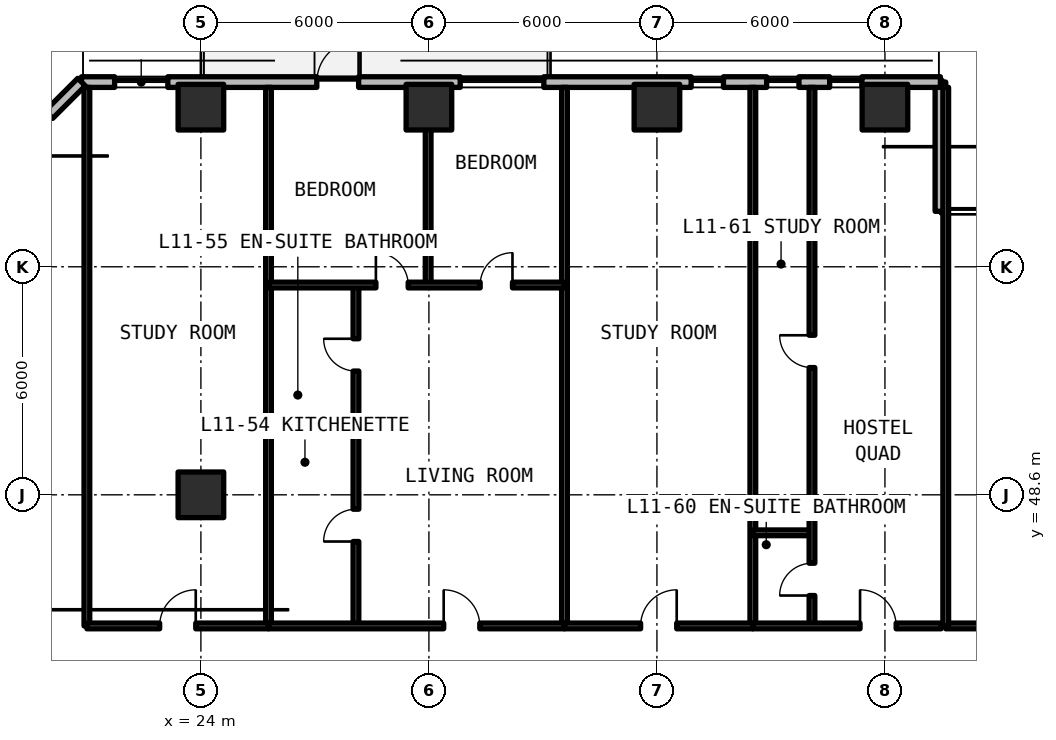
"""IFC4 building model, lengths in metres.
Left out: names, types, materials, properties, quantities, classifications, styles, units other than length and angle.
Written with IfcOpenShell. Run it as: python <this file> out.ifc"""

import sys

from ifc_helpers import new_model, si_unit, direction, frame, frame_2d, origin, origin_2d, place, context, subcontext, project, spatial, rectangle, extrude, element, fill, save


model = new_model("IFC4")
c1 = context("Model", 3, precision=1e-05, world=origin(), true_north=direction((0.0, 1.0)))
c2 = subcontext(c1, "Body", "Model", "MODEL_VIEW")
j1 = project(units=[si_unit("LENGTHUNIT", "METRE"), si_unit("PLANEANGLEUNIT", "RADIAN")], contexts=[c1])
p1 = place(None, origin())
s1 = spatial("IfcSite", under=j1, at=p1, CompositionType="ELEMENT")
p2 = place(p1, origin())
s2 = spatial("IfcBuilding", under=s1, at=p2, CompositionType="ELEMENT")
p3 = place(p2, frame((0.0, 0.0, 42.24)))
s3 = spatial("IfcBuildingStorey", under=s2, at=p3, CompositionType="ELEMENT", Elevation=42.24)
for number, where, z_axis, x_axis in (
    (1, (24.0, 48.6, 0.0), (0.0, 0.0, 1.0), (1.0, 0.0, 0.0)),
    (2, (24.0, 58.8, 0.0), (0.0, 0.0, 1.0), (1.0, 0.0, 0.0)),
    (3, (30.0, 58.8, 0.0), (0.0, 0.0, 1.0), (1.0, 0.0, 0.0)),
    (4, (36.0, 58.8, 0.0), (0.0, 0.0, 1.0), (1.0, 0.0, 0.0)),
    (5, (42.0, 58.8, 0.0), (0.0, 0.0, 1.0), (1.0, 0.0, 0.0)),
):
    element("IfcColumn", number, at=place(p3, frame(where, z_axis=z_axis, x_axis=x_axis)), inside=s3, PredefinedType="COLUMN", context=c2, shape_type="SweptSolid", body=[
        extrude(rectangle(XDim=1.2, YDim=1.2, at=origin_2d()), origin(), (0.0, 0.0, 1.0), 3.3),
    ])
p4 = place(p3, frame((43.46, 56.06, 0.0), z_axis=(0.0, 0.0, 1.0), x_axis=(0.0, 1.0, 0.0)))
e6 = element("IfcWall", 6, at=p4, inside=s3, PredefinedType="SOLIDWALL", context=c2, shape_type="SweptSolid", body=[
    extrude(rectangle(XDim=3.4, YDim=0.28, at=frame_2d((1.7, 0.0))), origin(), (0.0, 0.0, 1.0), 3.08),
])
p5 = place(p3, frame((43.46, 59.46, 0.0), z_axis=(0.0, 0.0, 1.0), x_axis=(-1.0, 0.0, 0.0)))
e7 = element("IfcWall", 7, at=p5, inside=s3, PredefinedType="SOLIDWALL", context=c2, shape_type="SweptSolid", body=[
    extrude(rectangle(XDim=22.602, YDim=0.28, at=frame_2d((11.301, 0.0))), origin(), (0.0, 0.0, 1.0), 3.08),
])
p6 = place(p5, frame((15.31, 0.0, 0.0)))
e8 = element("IfcOpeningElement", 8, at=p6, cuts=e7, PredefinedType="OPENING", context=c2, shape_type="SweptSolid", body=[
    extrude(rectangle(XDim=1.1, YDim=2.15, at=frame_2d((0.55, 1.075))), frame((0.0, 0.15, 0.0), z_axis=(0.0, -1.0, 0.0), x_axis=(1.0, 0.0, 0.0)), (0.0, 0.0, 1.0), 0.3),
])
p7 = place(p5, frame((20.33, 0.0, 0.78)))
e9 = element("IfcOpeningElement", 9, at=p7, cuts=e7, PredefinedType="OPENING", context=c2, shape_type="SweptSolid", body=[
    extrude(rectangle(XDim=1.4, YDim=1.65, at=frame_2d((0.7, 0.825))), frame((0.0, 0.15, 0.0), z_axis=(0.0, -1.0, 0.0), x_axis=(1.0, 0.0, 0.0)), (0.0, 0.0, 1.0), 0.3),
])
p8 = place(p5, frame((10.436, 0.0, 0.78)))
e10 = element("IfcOpeningElement", 10, at=p8, cuts=e7, PredefinedType="OPENING", context=c2, shape_type="SweptSolid", body=[
    extrude(rectangle(XDim=2.2, YDim=1.66, at=frame_2d((1.1, 0.83))), frame((0.0, 0.15, 0.0), z_axis=(0.0, -1.0, 0.0), x_axis=(1.0, 0.0, 0.0)), (0.0, 0.0, 1.0), 0.3),
])
p9 = place(p5, frame((5.709, 0.0, 0.78)))
e11 = element("IfcOpeningElement", 11, at=p9, cuts=e7, PredefinedType="OPENING", context=c2, shape_type="SweptSolid", body=[
    extrude(rectangle(XDim=0.85, YDim=1.65, at=frame_2d((0.425, 0.825))), frame((0.0, 0.15, 0.0), z_axis=(0.0, -1.0, 0.0), x_axis=(1.0, 0.0, 0.0)), (0.0, 0.0, 1.0), 0.3),
])
p10 = place(p5, frame((3.723, 0.0, 0.78)))
e12 = element("IfcOpeningElement", 12, at=p10, cuts=e7, PredefinedType="OPENING", context=c2, shape_type="SweptSolid", body=[
    extrude(rectangle(XDim=0.85, YDim=1.65, at=frame_2d((0.425, 0.825))), frame((0.0, 0.15, 0.0), z_axis=(0.0, -1.0, 0.0), x_axis=(1.0, 0.0, 0.0)), (0.0, 0.0, 1.0), 0.3),
])
p11 = place(p5, frame((2.065, 0.0, 0.78)))
e13 = element("IfcOpeningElement", 13, at=p11, cuts=e7, PredefinedType="OPENING", context=c2, shape_type="SweptSolid", body=[
    extrude(rectangle(XDim=0.85, YDim=1.65, at=frame_2d((0.425, 0.825))), frame((0.0, 0.15, 0.0), z_axis=(0.0, -1.0, 0.0), x_axis=(1.0, 0.0, 0.0)), (0.0, 0.0, 1.0), 0.3),
])
p12 = place(p3, frame((20.858, 59.46, 0.0), z_axis=(0.0, 0.0, 1.0), x_axis=(-0.707106781187, -0.707106781187, 0.0)))
e14 = element("IfcWall", 14, at=p12, inside=s3, PredefinedType="SOLIDWALL", context=c2, shape_type="SweptSolid", body=[
    extrude(rectangle(XDim=5.824, YDim=0.28, at=frame_2d((2.912, 0.0))), origin(), (0.0, 0.0, 1.0), 3.08),
])
p13 = place(p12, frame((1.212, 0.0, 0.78)))
e15 = element("IfcOpeningElement", 15, at=p13, cuts=e14, PredefinedType="OPENING", context=c2, shape_type="SweptSolid", body=[
    extrude(rectangle(XDim=3.4, YDim=1.66, at=frame_2d((1.7, 0.83))), frame((0.0, 0.15, 0.0), z_axis=(0.0, -1.0, 0.0), x_axis=(1.0, 0.0, 0.0)), (0.0, 0.0, 1.0), 0.3),
])
p14 = place(p3, frame((43.6, 45.15, 0.0), z_axis=(0.0, 0.0, 1.0), x_axis=(1.0, 0.0, 0.0)))
e16 = element("IfcWall", 16, at=p14, inside=s3, PredefinedType="SOLIDWALL", context=c2, shape_type="SweptSolid", body=[
    extrude(rectangle(XDim=8.4, YDim=0.15, at=frame_2d((4.2, 0.0))), origin(), (0.0, 0.0, 1.0), 2.35),
])
p15 = place(p14, frame((3.65, 0.0, 0.0)))
e17 = element("IfcOpeningElement", 17, at=p15, cuts=e16, PredefinedType="OPENING", context=c2, shape_type="SweptSolid", body=[
    extrude(rectangle(XDim=1.1, YDim=2.15, at=frame_2d((0.55, 1.075))), frame((0.0, 0.085, 0.0), z_axis=(0.0, -1.0, 0.0), x_axis=(1.0, 0.0, 0.0)), (0.0, 0.0, 1.0), 0.17),
])
for number, where, z_axis, x_axis in (
    (18, (43.6, 45.15, 0.0), (0.0, 0.0, 1.0), (0.0, 1.0, 0.0)),
    (19, (21.0, 45.15, 0.0), (0.0, 0.0, 1.0), (0.0, 1.0, 0.0)),
    (20, (25.779, 45.15, 0.0), (0.0, 0.0, 1.0), (0.0, 1.0, 0.0)),
):
    element("IfcWall", number, at=place(p3, frame(where, z_axis=z_axis, x_axis=x_axis)), inside=s3, PredefinedType="SOLIDWALL", context=c2, shape_type="SweptSolid", body=[
        extrude(rectangle(XDim=14.17, YDim=0.15, at=frame_2d((7.085, 0.0))), origin(), (0.0, 0.0, 1.0), 2.35),
    ])
p16 = place(p3, frame((21.0, 45.15, 0.0), z_axis=(0.0, 0.0, 1.0), x_axis=(1.0, 0.0, 0.0)))
e21 = element("IfcWall", 21, at=p16, inside=s3, PredefinedType="SOLIDWALL", context=c2, shape_type="SweptSolid", body=[
    extrude(rectangle(XDim=4.779, YDim=0.15, at=frame_2d((2.39, 0.0))), origin(), (0.0, 0.0, 1.0), 2.35),
])
p17 = place(p16, frame((1.915, 0.0, 0.0)))
e22 = element("IfcOpeningElement", 22, at=p17, cuts=e21, PredefinedType="OPENING", context=c2, shape_type="SweptSolid", body=[
    extrude(rectangle(XDim=0.95, YDim=2.15, at=frame_2d((0.475, 1.075))), frame((0.0, 0.085, 0.0), z_axis=(0.0, -1.0, 0.0), x_axis=(1.0, 0.0, 0.0)), (0.0, 0.0, 1.0), 0.17),
])
p18 = place(p3, frame((33.567, 45.15, 0.0), z_axis=(0.0, 0.0, 1.0), x_axis=(0.0, 1.0, 0.0)))
e23 = element("IfcWall", 23, at=p18, inside=s3, PredefinedType="SOLIDWALL", context=c2, shape_type="SweptSolid", body=[
    extrude(rectangle(XDim=14.17, YDim=0.15, at=frame_2d((7.085, 0.0))), origin(), (0.0, 0.0, 1.0), 2.35),
])
p19 = place(p3, frame((25.779, 50.442, 0.0), z_axis=(0.0, 0.0, 1.0), x_axis=(1.0, 0.0, 0.0)))
e24 = element("IfcWall", 24, at=p19, inside=s3, PredefinedType="PARTITIONING", context=c2, shape_type="SweptSolid", body=[
    extrude(rectangle(XDim=2.301, YDim=0.15, at=frame_2d((1.15, 0.0))), origin(), (0.0, 0.0, 1.0), 2.35),
])
p20 = place(p3, frame((28.08, 45.15, 0.0), z_axis=(0.0, 0.0, 1.0), x_axis=(0.0, 1.0, 0.0)))
e25 = element("IfcWall", 25, at=p20, inside=s3, PredefinedType="PARTITIONING", context=c2, shape_type="SweptSolid", body=[
    extrude(rectangle(XDim=8.97, YDim=0.15, at=frame_2d((4.485, 0.0))), origin(), (0.0, 0.0, 1.0), 2.35),
])
p21 = place(p20, frame((2.221, 0.0, 0.0)))
e26 = element("IfcOpeningElement", 26, at=p21, cuts=e25, PredefinedType="OPENING", context=c2, shape_type="SweptSolid", body=[
    extrude(rectangle(XDim=0.85, YDim=2.1, at=frame_2d((0.425, 1.05))), frame((0.0, 0.085, 0.0), z_axis=(0.0, -1.0, 0.0), x_axis=(1.0, 0.0, 0.0)), (0.0, 0.0, 1.0), 0.17),
])
p22 = place(p20, frame((6.706, 0.0, 0.0)))
e27 = element("IfcOpeningElement", 27, at=p22, cuts=e25, PredefinedType="OPENING", context=c2, shape_type="SweptSolid", body=[
    extrude(rectangle(XDim=0.85, YDim=2.1, at=frame_2d((0.425, 1.05))), frame((0.0, 0.085, 0.0), z_axis=(0.0, -1.0, 0.0), x_axis=(1.0, 0.0, 0.0)), (0.0, 0.0, 1.0), 0.17),
])
p23 = place(p3, frame((29.98, 54.12, 0.0), z_axis=(0.0, 0.0, 1.0), x_axis=(0.0, 1.0, 0.0)))
e28 = element("IfcWall", 28, at=p23, inside=s3, PredefinedType="PARTITIONING", context=c2, shape_type="SweptSolid", body=[
    extrude(rectangle(XDim=5.2, YDim=0.15, at=frame_2d((2.6, 0.0))), origin(), (0.0, 0.0, 1.0), 2.35),
])
p24 = place(p3, frame((25.779, 54.12, 0.0), z_axis=(0.0, 0.0, 1.0), x_axis=(1.0, 0.0, 0.0)))
e29 = element("IfcWall", 29, at=p24, inside=s3, PredefinedType="PARTITIONING", context=c2, shape_type="SweptSolid", body=[
    extrude(rectangle(XDim=7.788, YDim=0.15, at=frame_2d((3.894, 0.0))), origin(), (0.0, 0.0, 1.0), 2.35),
])
p25 = place(p24, frame((2.826, 0.0, 0.0)))
e30 = element("IfcOpeningElement", 30, at=p25, cuts=e29, PredefinedType="OPENING", context=c2, shape_type="SweptSolid", body=[
    extrude(rectangle(XDim=0.85, YDim=2.1, at=frame_2d((0.425, 1.05))), frame((0.0, 0.085, 0.0), z_axis=(0.0, -1.0, 0.0), x_axis=(1.0, 0.0, 0.0)), (0.0, 0.0, 1.0), 0.17),
])
p26 = place(p24, frame((5.57, 0.0, 0.0)))
e31 = element("IfcOpeningElement", 31, at=p26, cuts=e29, PredefinedType="OPENING", context=c2, shape_type="SweptSolid", body=[
    extrude(rectangle(XDim=0.85, YDim=2.1, at=frame_2d((0.425, 1.05))), frame((0.0, 0.085, 0.0), z_axis=(0.0, -1.0, 0.0), x_axis=(1.0, 0.0, 0.0)), (0.0, 0.0, 1.0), 0.17),
])
p27 = place(p3, frame((25.779, 45.15, 0.0), z_axis=(0.0, 0.0, 1.0), x_axis=(1.0, 0.0, 0.0)))
e32 = element("IfcWall", 32, at=p27, inside=s3, PredefinedType="SOLIDWALL", context=c2, shape_type="SweptSolid", body=[
    extrude(rectangle(XDim=7.788, YDim=0.15, at=frame_2d((3.894, 0.0))), origin(), (0.0, 0.0, 1.0), 2.35),
])
p28 = place(p27, frame((4.61, 0.0, 0.0)))
e33 = element("IfcOpeningElement", 33, at=p28, cuts=e32, PredefinedType="OPENING", context=c2, shape_type="SweptSolid", body=[
    extrude(rectangle(XDim=0.95, YDim=2.15, at=frame_2d((0.475, 1.075))), frame((0.0, 0.085, 0.0), z_axis=(0.0, -1.0, 0.0), x_axis=(1.0, 0.0, 0.0)), (0.0, 0.0, 1.0), 0.17),
])
p29 = place(p3, frame((38.524, 45.15, 0.0), z_axis=(0.0, 0.0, 1.0), x_axis=(0.0, 1.0, 0.0)))
e34 = element("IfcWall", 34, at=p29, inside=s3, PredefinedType="SOLIDWALL", context=c2, shape_type="SweptSolid", body=[
    extrude(rectangle(XDim=14.17, YDim=0.15, at=frame_2d((7.085, 0.0))), origin(), (0.0, 0.0, 1.0), 2.35),
])
p30 = place(p3, frame((33.567, 45.15, 0.0), z_axis=(0.0, 0.0, 1.0), x_axis=(1.0, 0.0, 0.0)))
e35 = element("IfcWall", 35, at=p30, inside=s3, PredefinedType="SOLIDWALL", context=c2, shape_type="SweptSolid", body=[
    extrude(rectangle(XDim=4.956, YDim=0.15, at=frame_2d((2.478, 0.0))), origin(), (0.0, 0.0, 1.0), 2.35),
])
p31 = place(p30, frame((2.003, 0.0, 0.0)))
e36 = element("IfcOpeningElement", 36, at=p31, cuts=e35, PredefinedType="OPENING", context=c2, shape_type="SweptSolid", body=[
    extrude(rectangle(XDim=0.95, YDim=2.15, at=frame_2d((0.475, 1.075))), frame((0.0, 0.085, 0.0), z_axis=(0.0, -1.0, 0.0), x_axis=(1.0, 0.0, 0.0)), (0.0, 0.0, 1.0), 0.17),
])
p32 = place(p3, frame((38.524, 47.6, 0.0), z_axis=(0.0, 0.0, 1.0), x_axis=(1.0, 0.0, 0.0)))
e37 = element("IfcWall", 37, at=p32, inside=s3, PredefinedType="PARTITIONING", context=c2, shape_type="SweptSolid", body=[
    extrude(rectangle(XDim=1.556, YDim=0.15, at=frame_2d((0.778, 0.0))), origin(), (0.0, 0.0, 1.0), 2.35),
])
p33 = place(p3, frame((40.08, 45.15, 0.0), z_axis=(0.0, 0.0, 1.0), x_axis=(0.0, 1.0, 0.0)))
e38 = element("IfcWall", 38, at=p33, inside=s3, PredefinedType="PARTITIONING", context=c2, shape_type="SweptSolid", body=[
    extrude(rectangle(XDim=14.17, YDim=0.15, at=frame_2d((7.085, 0.0))), origin(), (0.0, 0.0, 1.0), 2.35),
])
p34 = place(p33, frame((0.8, 0.0, 0.0)))
e39 = element("IfcOpeningElement", 39, at=p34, cuts=e38, PredefinedType="OPENING", context=c2, shape_type="SweptSolid", body=[
    extrude(rectangle(XDim=0.85, YDim=2.1, at=frame_2d((0.425, 1.05))), frame((0.0, 0.085, 0.0), z_axis=(0.0, -1.0, 0.0), x_axis=(1.0, 0.0, 0.0)), (0.0, 0.0, 1.0), 0.17),
])
p35 = place(p33, frame((6.798, 0.0, 0.0)))
e40 = element("IfcOpeningElement", 40, at=p35, cuts=e38, PredefinedType="OPENING", context=c2, shape_type="SweptSolid", body=[
    extrude(rectangle(XDim=0.85, YDim=2.1, at=frame_2d((0.425, 1.05))), frame((0.0, 0.085, 0.0), z_axis=(0.0, -1.0, 0.0), x_axis=(1.0, 0.0, 0.0)), (0.0, 0.0, 1.0), 0.17),
])
p36 = place(p3, frame((38.524, 45.15, 0.0), z_axis=(0.0, 0.0, 1.0), x_axis=(1.0, 0.0, 0.0)))
e41 = element("IfcWall", 41, at=p36, inside=s3, PredefinedType="SOLIDWALL", context=c2, shape_type="SweptSolid", body=[
    extrude(rectangle(XDim=4.956, YDim=0.15, at=frame_2d((2.478, 0.0))), origin(), (0.0, 0.0, 1.0), 2.35),
])
p37 = place(p36, frame((2.821, 0.0, 0.0)))
e42 = element("IfcOpeningElement", 42, at=p37, cuts=e41, PredefinedType="OPENING", context=c2, shape_type="SweptSolid", body=[
    extrude(rectangle(XDim=0.95, YDim=2.15, at=frame_2d((0.475, 1.075))), frame((0.0, 0.085, 0.0), z_axis=(0.0, -1.0, 0.0), x_axis=(1.0, 0.0, 0.0)), (0.0, 0.0, 1.0), 0.17),
])
p38 = place(p6, frame((1.1, 0.0, 0.0), z_axis=(0.0, 0.0, 1.0), x_axis=(-1.0, 0.0, 0.0)))
e43 = element("IfcDoor", 43, at=p38, inside=s3, OperationType="SINGLE_SWING_LEFT", PredefinedType="DOOR", context=c2, shape_type="SweptSolid", body=[
    extrude(rectangle(XDim=1.1, YDim=2.15, at=frame_2d((0.55, 1.075))), frame((0.0, 0.025, 0.0), z_axis=(0.0, -1.0, 0.0), x_axis=(1.0, 0.0, 0.0)), (0.0, 0.0, 1.0), 0.05),
])
fill(e8, e43)
p39 = place(p7, origin())
e44 = element("IfcWindow", 44, at=p39, inside=s3, PartitioningType="SINGLE_PANEL", PredefinedType="WINDOW", context=c2, shape_type="SweptSolid", body=[
    extrude(rectangle(XDim=1.4, YDim=1.65, at=frame_2d((0.7, 0.825))), frame((0.0, 0.03, 0.0), z_axis=(0.0, -1.0, 0.0), x_axis=(1.0, 0.0, 0.0)), (0.0, 0.0, 1.0), 0.06),
])
fill(e9, e44)
p40 = place(p8, origin())
e45 = element("IfcWindow", 45, at=p40, inside=s3, PartitioningType="SINGLE_PANEL", PredefinedType="WINDOW", context=c2, shape_type="SweptSolid", body=[
    extrude(rectangle(XDim=2.2, YDim=1.66, at=frame_2d((1.1, 0.83))), frame((0.0, 0.03, 0.0), z_axis=(0.0, -1.0, 0.0), x_axis=(1.0, 0.0, 0.0)), (0.0, 0.0, 1.0), 0.06),
])
fill(e10, e45)
p41 = place(p9, origin())
e46 = element("IfcWindow", 46, at=p41, inside=s3, PartitioningType="SINGLE_PANEL", PredefinedType="WINDOW", context=c2, shape_type="SweptSolid", body=[
    extrude(rectangle(XDim=0.85, YDim=1.65, at=frame_2d((0.425, 0.825))), frame((0.0, 0.03, 0.0), z_axis=(0.0, -1.0, 0.0), x_axis=(1.0, 0.0, 0.0)), (0.0, 0.0, 1.0), 0.06),
])
fill(e11, e46)
p42 = place(p10, origin())
e47 = element("IfcWindow", 47, at=p42, inside=s3, PartitioningType="SINGLE_PANEL", PredefinedType="WINDOW", context=c2, shape_type="SweptSolid", body=[
    extrude(rectangle(XDim=0.85, YDim=1.65, at=frame_2d((0.425, 0.825))), frame((0.0, 0.03, 0.0), z_axis=(0.0, -1.0, 0.0), x_axis=(1.0, 0.0, 0.0)), (0.0, 0.0, 1.0), 0.06),
])
fill(e12, e47)
p43 = place(p11, origin())
e48 = element("IfcWindow", 48, at=p43, inside=s3, PartitioningType="SINGLE_PANEL", PredefinedType="WINDOW", context=c2, shape_type="SweptSolid", body=[
    extrude(rectangle(XDim=0.85, YDim=1.65, at=frame_2d((0.425, 0.825))), frame((0.0, 0.03, 0.0), z_axis=(0.0, -1.0, 0.0), x_axis=(1.0, 0.0, 0.0)), (0.0, 0.0, 1.0), 0.06),
])
fill(e13, e48)
p44 = place(p17, origin())
e49 = element("IfcDoor", 49, at=p44, inside=s3, OperationType="SINGLE_SWING_RIGHT", PredefinedType="DOOR", context=c2, shape_type="SweptSolid", body=[
    extrude(rectangle(XDim=0.95, YDim=2.15, at=frame_2d((0.475, 1.075))), frame((0.0, 0.025, 0.0), z_axis=(0.0, -1.0, 0.0), x_axis=(1.0, 0.0, 0.0)), (0.0, 0.0, 1.0), 0.05),
])
fill(e22, e49)
p45 = place(p21, origin())
e50 = element("IfcDoor", 50, at=p45, inside=s3, OperationType="SINGLE_SWING_LEFT", PredefinedType="DOOR", context=c2, shape_type="SweptSolid", body=[
    extrude(rectangle(XDim=0.85, YDim=2.1, at=frame_2d((0.425, 1.05))), frame((0.0, 0.025, 0.0), z_axis=(0.0, -1.0, 0.0), x_axis=(1.0, 0.0, 0.0)), (0.0, 0.0, 1.0), 0.05),
])
fill(e26, e50)
p46 = place(p22, origin())
e51 = element("IfcDoor", 51, at=p46, inside=s3, OperationType="SINGLE_SWING_RIGHT", PredefinedType="DOOR", context=c2, shape_type="SweptSolid", body=[
    extrude(rectangle(XDim=0.85, YDim=2.1, at=frame_2d((0.425, 1.05))), frame((0.0, 0.025, 0.0), z_axis=(0.0, -1.0, 0.0), x_axis=(1.0, 0.0, 0.0)), (0.0, 0.0, 1.0), 0.05),
])
fill(e27, e51)
p47 = place(p25, origin())
e52 = element("IfcDoor", 52, at=p47, inside=s3, OperationType="SINGLE_SWING_LEFT", PredefinedType="DOOR", context=c2, shape_type="SweptSolid", body=[
    extrude(rectangle(XDim=0.85, YDim=2.1, at=frame_2d((0.425, 1.05))), frame((0.0, 0.025, 0.0), z_axis=(0.0, -1.0, 0.0), x_axis=(1.0, 0.0, 0.0)), (0.0, 0.0, 1.0), 0.05),
])
fill(e30, e52)
p48 = place(p26, origin())
e53 = element("IfcDoor", 53, at=p48, inside=s3, OperationType="SINGLE_SWING_RIGHT", PredefinedType="DOOR", context=c2, shape_type="SweptSolid", body=[
    extrude(rectangle(XDim=0.85, YDim=2.1, at=frame_2d((0.425, 1.05))), frame((0.0, 0.025, 0.0), z_axis=(0.0, -1.0, 0.0), x_axis=(1.0, 0.0, 0.0)), (0.0, 0.0, 1.0), 0.05),
])
fill(e31, e53)
p49 = place(p28, origin())
e54 = element("IfcDoor", 54, at=p49, inside=s3, OperationType="SINGLE_SWING_LEFT", PredefinedType="DOOR", context=c2, shape_type="SweptSolid", body=[
    extrude(rectangle(XDim=0.95, YDim=2.15, at=frame_2d((0.475, 1.075))), frame((0.0, 0.025, 0.0), z_axis=(0.0, -1.0, 0.0), x_axis=(1.0, 0.0, 0.0)), (0.0, 0.0, 1.0), 0.05),
])
fill(e33, e54)
p50 = place(p31, origin())
e55 = element("IfcDoor", 55, at=p50, inside=s3, OperationType="SINGLE_SWING_RIGHT", PredefinedType="DOOR", context=c2, shape_type="SweptSolid", body=[
    extrude(rectangle(XDim=0.95, YDim=2.15, at=frame_2d((0.475, 1.075))), frame((0.0, 0.025, 0.0), z_axis=(0.0, -1.0, 0.0), x_axis=(1.0, 0.0, 0.0)), (0.0, 0.0, 1.0), 0.05),
])
fill(e36, e55)
p51 = place(p34, origin())
e56 = element("IfcDoor", 56, at=p51, inside=s3, OperationType="SINGLE_SWING_LEFT", PredefinedType="DOOR", context=c2, shape_type="SweptSolid", body=[
    extrude(rectangle(XDim=0.85, YDim=2.1, at=frame_2d((0.425, 1.05))), frame((0.0, 0.025, 0.0), z_axis=(0.0, -1.0, 0.0), x_axis=(1.0, 0.0, 0.0)), (0.0, 0.0, 1.0), 0.05),
])
fill(e39, e56)
p52 = place(p35, origin())
e57 = element("IfcDoor", 57, at=p52, inside=s3, OperationType="SINGLE_SWING_RIGHT", PredefinedType="DOOR", context=c2, shape_type="SweptSolid", body=[
    extrude(rectangle(XDim=0.85, YDim=2.1, at=frame_2d((0.425, 1.05))), frame((0.0, 0.025, 0.0), z_axis=(0.0, -1.0, 0.0), x_axis=(1.0, 0.0, 0.0)), (0.0, 0.0, 1.0), 0.05),
])
fill(e40, e57)
p53 = place(p37, origin())
e58 = element("IfcDoor", 58, at=p53, inside=s3, OperationType="SINGLE_SWING_LEFT", PredefinedType="DOOR", context=c2, shape_type="SweptSolid", body=[
    extrude(rectangle(XDim=0.95, YDim=2.15, at=frame_2d((0.475, 1.075))), frame((0.0, 0.025, 0.0), z_axis=(0.0, -1.0, 0.0), x_axis=(1.0, 0.0, 0.0)), (0.0, 0.0, 1.0), 0.05),
])
fill(e42, e58)
save(model, sys.argv[1])
